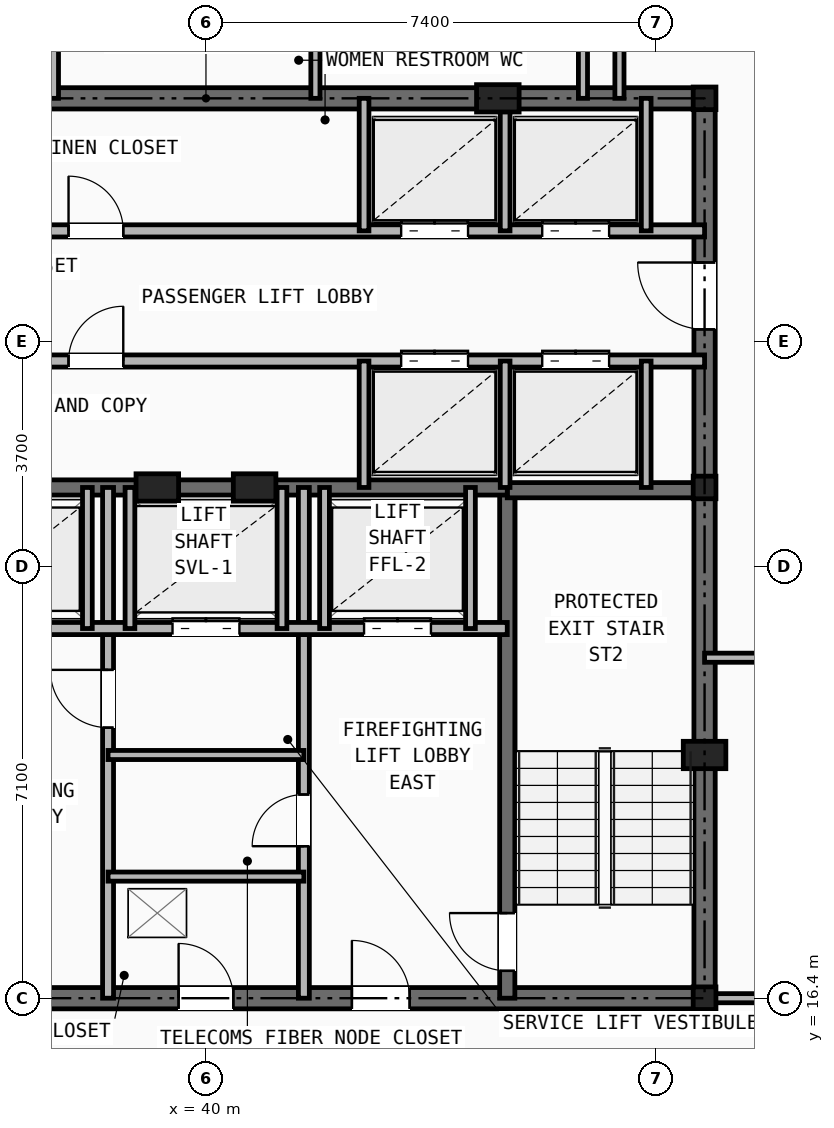
"""IFC4 building model, lengths in metres.
Left out: names, types, materials, properties, quantities, classifications, styles, units other than length and angle.
Written with IfcOpenShell. Run it as: python <this file> out.ifc"""

import sys

from ifc_helpers import new_model, si_unit, direction, frame, frame_2d, origin, origin_2d, place, context, subcontext, project, spatial, rectangle, i_section, extrude, element, fill, save


model = new_model("IFC4")
c1 = context("Model", 3, precision=1e-05, world=origin(), true_north=direction((0.0, 1.0)))
c2 = subcontext(c1, "Body", "Model", "MODEL_VIEW")
j1 = project(units=[si_unit("LENGTHUNIT", "METRE"), si_unit("PLANEANGLEUNIT", "RADIAN")], contexts=[c1])
p1 = place(None, origin())
s1 = spatial("IfcSite", under=j1, at=p1, CompositionType="ELEMENT")
p2 = place(p1, origin())
s2 = spatial("IfcBuilding", under=s1, at=p2, CompositionType="ELEMENT")
p3 = place(p2, frame((0.0, 0.0, 215.4)))
s3 = spatial("IfcBuildingStorey", under=s2, at=p3, CompositionType="ELEMENT", Elevation=215.4)
for number, where, z_axis, x_axis in (
    (1, (48.2, 16.4, 0.0), (0.0, 0.0, 1.0), (1.0, 0.0, 0.0)),
    (2, (48.2, 24.8, 0.0), (0.0, 0.0, 1.0), (1.0, 0.0, 0.0)),
    (3, (48.2, 31.2, 0.0), (0.0, 0.0, 1.0), (1.0, 0.0, 0.0)),
):
    element("IfcColumn", number, at=place(p3, frame(where, z_axis=z_axis, x_axis=x_axis)), inside=s3, PredefinedType="COLUMN", context=c2, shape_type="SweptSolid", body=[
        extrude(i_section(OverallWidth=0.374, OverallDepth=0.372, WebThickness=0.016, FlangeThickness=0.026, at=origin_2d()), origin(), (0.0, 0.0, 1.0), 3.5),
    ])
for number, where, z_axis, x_axis in (
    (4, (48.2, 20.4, 0.0), (0.0, 0.0, 1.0), (1.0, 0.0, 0.0)),
    (5, (44.8, 31.2, 0.0), (0.0, 0.0, 1.0), (1.0, 0.0, 0.0)),
    (6, (39.2, 24.8, 0.0), (0.0, 0.0, 1.0), (1.0, 0.0, 0.0)),
    (7, (40.8, 24.8, 0.0), (0.0, 0.0, 1.0), (1.0, 0.0, 0.0)),
):
    element("IfcColumn", number, at=place(p3, frame(where, z_axis=z_axis, x_axis=x_axis)), inside=s3, PredefinedType="PILASTER", context=c2, shape_type="SweptSolid", body=[
        extrude(rectangle(XDim=0.7, YDim=0.45, at=origin_2d()), origin(), (0.0, 0.0, 1.0), 3.5),
    ])
p4 = place(p3, frame((31.8, 16.4, 0.0), z_axis=(0.0, 0.0, 1.0), x_axis=(1.0, 0.0, 0.0)))
e8 = element("IfcWall", 8, at=p4, inside=s3, PredefinedType="SHEAR", context=c2, shape_type="SweptSolid", body=[
    extrude(rectangle(XDim=16.4, YDim=0.35, at=frame_2d((8.2, 0.0))), origin(), (0.0, 0.0, 1.0), 3.25),
])
p5 = place(p4, frame((7.75, 0.0, 0.0)))
e9 = element("IfcOpeningElement", 9, at=p5, cuts=e8, PredefinedType="OPENING", context=c2, shape_type="SweptSolid", body=[
    extrude(rectangle(XDim=0.9, YDim=2.1, at=frame_2d((0.45, 1.05))), frame((0.0, 0.185, 0.0), z_axis=(0.0, -1.0, 0.0), x_axis=(1.0, 0.0, 0.0)), (0.0, 0.0, 1.0), 0.37),
])
p6 = place(p4, frame((4.2, 0.0, 0.0)))
e10 = element("IfcOpeningElement", 10, at=p6, cuts=e8, PredefinedType="OPENING", context=c2, shape_type="SweptSolid", body=[
    extrude(rectangle(XDim=0.95, YDim=2.1, at=frame_2d((0.475, 1.05))), frame((0.0, 0.185, 0.0), z_axis=(0.0, -1.0, 0.0), x_axis=(1.0, 0.0, 0.0)), (0.0, 0.0, 1.0), 0.37),
])
p7 = place(p4, frame((10.6, 0.0, 0.0)))
e11 = element("IfcOpeningElement", 11, at=p7, cuts=e8, PredefinedType="OPENING", context=c2, shape_type="SweptSolid", body=[
    extrude(rectangle(XDim=0.95, YDim=2.1, at=frame_2d((0.475, 1.05))), frame((0.0, 0.185, 0.0), z_axis=(0.0, -1.0, 0.0), x_axis=(1.0, 0.0, 0.0)), (0.0, 0.0, 1.0), 0.37),
])
p8 = place(p3, frame((31.8, 31.2, 0.0), z_axis=(0.0, 0.0, 1.0), x_axis=(1.0, 0.0, 0.0)))
e12 = element("IfcWall", 12, at=p8, inside=s3, PredefinedType="SHEAR", context=c2, shape_type="SweptSolid", body=[
    extrude(rectangle(XDim=16.4, YDim=0.35, at=frame_2d((8.2, 0.0))), origin(), (0.0, 0.0, 1.0), 3.25),
])
p9 = place(p3, frame((48.2, 16.4, 0.0), z_axis=(0.0, 0.0, 1.0), x_axis=(0.0, 1.0, 0.0)))
e13 = element("IfcWall", 13, at=p9, inside=s3, PredefinedType="SHEAR", context=c2, shape_type="SweptSolid", body=[
    extrude(rectangle(XDim=14.8, YDim=0.35, at=frame_2d((7.4, 0.0))), origin(), (0.0, 0.0, 1.0), 3.25),
])
p10 = place(p9, frame((11.0, 0.0, 0.0)))
e14 = element("IfcOpeningElement", 14, at=p10, cuts=e13, PredefinedType="OPENING", context=c2, shape_type="SweptSolid", body=[
    extrude(rectangle(XDim=1.1, YDim=2.15, at=frame_2d((0.55, 1.075))), frame((0.0, 0.185, 0.0), z_axis=(0.0, -1.0, 0.0), x_axis=(1.0, 0.0, 0.0)), (0.0, 0.0, 1.0), 0.37),
])
p11 = place(p3, frame((44.955, 16.4, 0.0), z_axis=(0.0, 0.0, 1.0), x_axis=(0.0, 1.0, 0.0)))
e15 = element("IfcWall", 15, at=p11, inside=s3, PredefinedType="SHEAR", context=c2, shape_type="SweptSolid", body=[
    extrude(rectangle(XDim=8.4, YDim=0.25, at=frame_2d((4.2, 0.0))), origin(), (0.0, 0.0, 1.0), 3.25),
])
p12 = place(p11, frame((0.45, 0.0, 0.0)))
e16 = element("IfcOpeningElement", 16, at=p12, cuts=e15, PredefinedType="OPENING", context=c2, shape_type="SweptSolid", body=[
    extrude(rectangle(XDim=0.95, YDim=2.1, at=frame_2d((0.475, 1.05))), frame((0.0, 0.135, 0.0), z_axis=(0.0, -1.0, 0.0), x_axis=(1.0, 0.0, 0.0)), (0.0, 0.0, 1.0), 0.27),
])
p13 = place(p3, frame((44.955, 24.755, 0.0), z_axis=(0.0, 0.0, 1.0), x_axis=(1.0, 0.0, 0.0)))
e17 = element("IfcWall", 17, at=p13, inside=s3, PredefinedType="SHEAR", context=c2, shape_type="SweptSolid", body=[
    extrude(rectangle(XDim=3.245, YDim=0.25, at=frame_2d((1.623, 0.0))), origin(), (0.0, 0.0, 1.0), 3.25),
])
p14 = place(p3, frame((35.045, 24.8, 0.0), z_axis=(0.0, 0.0, 1.0), x_axis=(1.0, 0.0, 0.0)))
e18 = element("IfcWall", 18, at=p14, inside=s3, PredefinedType="SHEAR", context=c2, shape_type="SweptSolid", body=[
    extrude(rectangle(XDim=9.91, YDim=0.25, at=frame_2d((4.955, 0.0))), origin(), (0.0, 0.0, 1.0), 3.25),
])
p15 = place(p3, frame((38.39, 16.4, 0.0), z_axis=(0.0, 0.0, 1.0), x_axis=(0.0, 1.0, 0.0)))
e19 = element("IfcWall", 19, at=p15, inside=s3, PredefinedType="PARTITIONING", context=c2, shape_type="SweptSolid", body=[
    extrude(rectangle(XDim=8.4, YDim=0.18, at=frame_2d((4.2, 0.0))), origin(), (0.0, 0.0, 1.0), 2.705),
])
p16 = place(p15, frame((4.45, 0.0, 0.0)))
e20 = element("IfcOpeningElement", 20, at=p16, cuts=e19, PredefinedType="OPENING", context=c2, shape_type="SweptSolid", body=[
    extrude(rectangle(XDim=0.95, YDim=2.1, at=frame_2d((0.475, 1.05))), frame((0.0, 0.1, 0.0), z_axis=(0.0, -1.0, 0.0), x_axis=(1.0, 0.0, 0.0)), (0.0, 0.0, 1.0), 0.2),
])
p17 = place(p3, frame((41.61, 16.4, 0.0), z_axis=(0.0, 0.0, 1.0), x_axis=(0.0, 1.0, 0.0)))
e21 = element("IfcWall", 21, at=p17, inside=s3, PredefinedType="PARTITIONING", context=c2, shape_type="SweptSolid", body=[
    extrude(rectangle(XDim=8.4, YDim=0.18, at=frame_2d((4.2, 0.0))), origin(), (0.0, 0.0, 1.0), 2.705),
])
p18 = place(p17, frame((2.5, 0.0, 0.0)))
e22 = element("IfcOpeningElement", 22, at=p18, cuts=e21, PredefinedType="OPENING", context=c2, shape_type="SweptSolid", body=[
    extrude(rectangle(XDim=0.85, YDim=2.05, at=frame_2d((0.425, 1.025))), frame((0.0, 0.1, 0.0), z_axis=(0.0, -1.0, 0.0), x_axis=(1.0, 0.0, 0.0)), (0.0, 0.0, 1.0), 0.2),
])
p19 = place(p3, frame((35.045, 22.48, 0.0), z_axis=(0.0, 0.0, 1.0), x_axis=(1.0, 0.0, 0.0)))
e23 = element("IfcWall", 23, at=p19, inside=s3, PredefinedType="SOLIDWALL", context=c2, shape_type="SweptSolid", body=[
    extrude(rectangle(XDim=9.91, YDim=0.2, at=frame_2d((4.955, 0.0))), origin(), (0.0, 0.0, 1.0), 3.25),
])
p20 = place(p19, frame((1.255, 0.0, 0.0)))
e24 = element("IfcOpeningElement", 24, at=p20, cuts=e23, PredefinedType="OPENING", context=c2, shape_type="SweptSolid", body=[
    extrude(rectangle(XDim=1.1, YDim=2.15, at=frame_2d((0.55, 1.075))), frame((0.0, 0.11, 0.0), z_axis=(0.0, -1.0, 0.0), x_axis=(1.0, 0.0, 0.0)), (0.0, 0.0, 1.0), 0.22),
])
p21 = place(p19, frame((7.555, 0.0, 0.0)))
e25 = element("IfcOpeningElement", 25, at=p21, cuts=e23, PredefinedType="OPENING", context=c2, shape_type="SweptSolid", body=[
    extrude(rectangle(XDim=1.1, YDim=2.15, at=frame_2d((0.55, 1.075))), frame((0.0, 0.11, 0.0), z_axis=(0.0, -1.0, 0.0), x_axis=(1.0, 0.0, 0.0)), (0.0, 0.0, 1.0), 0.22),
])
p22 = place(p19, frame((4.405, 0.0, 0.0)))
e26 = element("IfcOpeningElement", 26, at=p22, cuts=e23, PredefinedType="OPENING", context=c2, shape_type="SweptSolid", body=[
    extrude(rectangle(XDim=1.1, YDim=2.15, at=frame_2d((0.55, 1.075))), frame((0.0, 0.11, 0.0), z_axis=(0.0, -1.0, 0.0), x_axis=(1.0, 0.0, 0.0)), (0.0, 0.0, 1.0), 0.22),
])
for number, where, z_axis, x_axis in (
    (27, (38.39, 18.4, 0.0), (0.0, 0.0, 1.0), (1.0, 0.0, 0.0)),
    (28, (38.39, 20.4, 0.0), (0.0, 0.0, 1.0), (1.0, 0.0, 0.0)),
):
    element("IfcWall", number, at=place(p3, frame(where, z_axis=z_axis, x_axis=x_axis)), inside=s3, PredefinedType="PARTITIONING", context=c2, shape_type="SweptSolid", body=[
        extrude(rectangle(XDim=3.22, YDim=0.15, at=frame_2d((1.61, 0.0))), origin(), (0.0, 0.0, 1.0), 3.25),
    ])
for number, where, z_axis, x_axis in (
    (29, (38.05, 22.48, 0.0), (0.0, 0.0, 1.0), (0.0, 1.0, 0.0)),
    (30, (41.95, 22.48, 0.0), (0.0, 0.0, 1.0), (0.0, 1.0, 0.0)),
    (31, (44.35, 22.48, 0.0), (0.0, 0.0, 1.0), (0.0, 1.0, 0.0)),
    (32, (38.75, 22.48, 0.0), (0.0, 0.0, 1.0), (0.0, 1.0, 0.0)),
    (33, (41.25, 22.48, 0.0), (0.0, 0.0, 1.0), (0.0, 1.0, 0.0)),
):
    element("IfcWall", number, at=place(p3, frame(where, z_axis=z_axis, x_axis=x_axis)), inside=s3, PredefinedType="SOLIDWALL", context=c2, shape_type="SweptSolid", body=[
        extrude(rectangle(XDim=2.32, YDim=0.16, at=frame_2d((1.16, 0.0))), origin(), (0.0, 0.0, 1.0), 3.25),
    ])
p23 = place(p3, frame((31.8, 29.02, 0.0), z_axis=(0.0, 0.0, 1.0), x_axis=(1.0, 0.0, 0.0)))
e34 = element("IfcWall", 34, at=p23, inside=s3, PredefinedType="SOLIDWALL", context=c2, shape_type="SweptSolid", body=[
    extrude(rectangle(XDim=16.4, YDim=0.2, at=frame_2d((8.2, 0.0))), origin(), (0.0, 0.0, 1.0), 2.705),
])
p24 = place(p23, frame((0.55, 0.0, 0.0)))
e35 = element("IfcOpeningElement", 35, at=p24, cuts=e34, PredefinedType="OPENING", context=c2, shape_type="SweptSolid", body=[
    extrude(rectangle(XDim=0.85, YDim=2.05, at=frame_2d((0.425, 1.025))), frame((0.0, 0.11, 0.0), z_axis=(0.0, -1.0, 0.0), x_axis=(1.0, 0.0, 0.0)), (0.0, 0.0, 1.0), 0.22),
])
p25 = place(p23, frame((5.94, 0.0, 0.0)))
e36 = element("IfcOpeningElement", 36, at=p25, cuts=e34, PredefinedType="OPENING", context=c2, shape_type="SweptSolid", body=[
    extrude(rectangle(XDim=0.9, YDim=2.1, at=frame_2d((0.45, 1.05))), frame((0.0, 0.11, 0.0), z_axis=(0.0, -1.0, 0.0), x_axis=(1.0, 0.0, 0.0)), (0.0, 0.0, 1.0), 0.22),
])
p26 = place(p23, frame((11.41, 0.0, 0.0)))
e37 = element("IfcOpeningElement", 37, at=p26, cuts=e34, PredefinedType="OPENING", context=c2, shape_type="SweptSolid", body=[
    extrude(rectangle(XDim=1.1, YDim=2.15, at=frame_2d((0.55, 1.075))), frame((0.0, 0.11, 0.0), z_axis=(0.0, -1.0, 0.0), x_axis=(1.0, 0.0, 0.0)), (0.0, 0.0, 1.0), 0.22),
])
p27 = place(p23, frame((13.73, 0.0, 0.0)))
e38 = element("IfcOpeningElement", 38, at=p27, cuts=e34, PredefinedType="OPENING", context=c2, shape_type="SweptSolid", body=[
    extrude(rectangle(XDim=1.1, YDim=2.15, at=frame_2d((0.55, 1.075))), frame((0.0, 0.11, 0.0), z_axis=(0.0, -1.0, 0.0), x_axis=(1.0, 0.0, 0.0)), (0.0, 0.0, 1.0), 0.22),
])
p28 = place(p3, frame((31.8, 26.88, 0.0), z_axis=(0.0, 0.0, 1.0), x_axis=(1.0, 0.0, 0.0)))
e39 = element("IfcWall", 39, at=p28, inside=s3, PredefinedType="SOLIDWALL", context=c2, shape_type="SweptSolid", body=[
    extrude(rectangle(XDim=16.4, YDim=0.2, at=frame_2d((8.2, 0.0))), origin(), (0.0, 0.0, 1.0), 2.705),
])
p29 = place(p28, frame((0.55, 0.0, 0.0)))
e40 = element("IfcOpeningElement", 40, at=p29, cuts=e39, PredefinedType="OPENING", context=c2, shape_type="SweptSolid", body=[
    extrude(rectangle(XDim=0.85, YDim=2.05, at=frame_2d((0.425, 1.025))), frame((0.0, 0.11, 0.0), z_axis=(0.0, -1.0, 0.0), x_axis=(1.0, 0.0, 0.0)), (0.0, 0.0, 1.0), 0.22),
])
p30 = place(p28, frame((5.94, 0.0, 0.0)))
e41 = element("IfcOpeningElement", 41, at=p30, cuts=e39, PredefinedType="OPENING", context=c2, shape_type="SweptSolid", body=[
    extrude(rectangle(XDim=0.9, YDim=2.1, at=frame_2d((0.45, 1.05))), frame((0.0, 0.11, 0.0), z_axis=(0.0, -1.0, 0.0), x_axis=(1.0, 0.0, 0.0)), (0.0, 0.0, 1.0), 0.22),
])
p31 = place(p28, frame((11.41, 0.0, 0.0)))
e42 = element("IfcOpeningElement", 42, at=p31, cuts=e39, PredefinedType="OPENING", context=c2, shape_type="SweptSolid", body=[
    extrude(rectangle(XDim=1.1, YDim=2.15, at=frame_2d((0.55, 1.075))), frame((0.0, 0.11, 0.0), z_axis=(0.0, -1.0, 0.0), x_axis=(1.0, 0.0, 0.0)), (0.0, 0.0, 1.0), 0.22),
])
p32 = place(p28, frame((13.73, 0.0, 0.0)))
e43 = element("IfcOpeningElement", 43, at=p32, cuts=e39, PredefinedType="OPENING", context=c2, shape_type="SweptSolid", body=[
    extrude(rectangle(XDim=1.1, YDim=2.15, at=frame_2d((0.55, 1.075))), frame((0.0, 0.11, 0.0), z_axis=(0.0, -1.0, 0.0), x_axis=(1.0, 0.0, 0.0)), (0.0, 0.0, 1.0), 0.22),
])
for number, where, z_axis, x_axis in (
    (44, (42.6, 29.02, 0.0), (0.0, 0.0, 1.0), (0.0, 1.0, 0.0)),
    (45, (44.92, 29.02, 0.0), (0.0, 0.0, 1.0), (0.0, 1.0, 0.0)),
    (46, (47.24, 29.02, 0.0), (0.0, 0.0, 1.0), (0.0, 1.0, 0.0)),
):
    element("IfcWall", number, at=place(p3, frame(where, z_axis=z_axis, x_axis=x_axis)), inside=s3, PredefinedType="SOLIDWALL", context=c2, shape_type="SweptSolid", body=[
        extrude(rectangle(XDim=2.18, YDim=0.16, at=frame_2d((1.09, 0.0))), origin(), (0.0, 0.0, 1.0), 2.705),
    ])
for number, where, z_axis, x_axis in (
    (47, (42.6, 24.8, 0.0), (0.0, 0.0, 1.0), (0.0, 1.0, 0.0)),
    (48, (44.92, 24.8, 0.0), (0.0, 0.0, 1.0), (0.0, 1.0, 0.0)),
    (49, (47.24, 24.8, 0.0), (0.0, 0.0, 1.0), (0.0, 1.0, 0.0)),
):
    element("IfcWall", number, at=place(p3, frame(where, z_axis=z_axis, x_axis=x_axis)), inside=s3, PredefinedType="SOLIDWALL", context=c2, shape_type="SweptSolid", body=[
        extrude(rectangle(XDim=2.08, YDim=0.16, at=frame_2d((1.04, 0.0))), origin(), (0.0, 0.0, 1.0), 3.25),
    ])
for number, where, z_axis, x_axis in (
    (50, (46.2, 31.2, 0.0), (0.0, 0.0, 1.0), (0.0, 1.0, 0.0)),
    (51, (37.5, 31.2, 0.0), (0.0, 0.0, 1.0), (0.0, 1.0, 0.0)),
    (52, (41.8, 31.2, 0.0), (0.0, 0.0, 1.0), (0.0, 1.0, 0.0)),
):
    element("IfcWall", number, at=place(p3, frame(where, z_axis=z_axis, x_axis=x_axis)), inside=s3, PredefinedType="PARTITIONING", context=c2, shape_type="SweptSolid", body=[
        extrude(rectangle(XDim=2.6, YDim=0.15, at=frame_2d((1.3, 0.0))), origin(), (0.0, 0.0, 1.0), 2.705),
    ])
p33 = place(p3, frame((48.2, 16.4, 0.0), z_axis=(0.0, 0.0, 1.0), x_axis=(1.0, 0.0, 0.0)))
e53 = element("IfcWall", 53, at=p33, inside=s3, PredefinedType="PARTITIONING", context=c2, shape_type="SweptSolid", body=[
    extrude(rectangle(XDim=15.888, YDim=0.15, at=frame_2d((7.944, 0.0))), origin(), (0.0, 0.0, 1.0), 2.292),
])
p34 = place(p3, frame((46.8, 31.2, 0.0), z_axis=(0.0, 0.0, 1.0), x_axis=(0.0, 1.0, 0.0)))
e54 = element("IfcWall", 54, at=p34, inside=s3, PredefinedType="PARTITIONING", context=c2, shape_type="SweptSolid", body=[
    extrude(rectangle(XDim=4.5, YDim=0.15, at=frame_2d((2.25, 0.0))), origin(), (0.0, 0.0, 1.0), 2.705),
])
p35 = place(p3, frame((48.2, 22.0, 0.0), z_axis=(0.0, 0.0, 1.0), x_axis=(1.0, 0.0, 0.0)))
e55 = element("IfcWall", 55, at=p35, inside=s3, PredefinedType="PARTITIONING", context=c2, shape_type="SweptSolid", body=[
    extrude(rectangle(XDim=12.052, YDim=0.15, at=frame_2d((6.026, 0.0))), origin(), (0.0, 0.0, 1.0), 2.292),
])
p36 = place(p35, frame((1.4, 0.0, 0.0)))
e56 = element("IfcOpeningElement", 56, at=p36, cuts=e55, PredefinedType="OPENING", context=c2, shape_type="SweptSolid", body=[
    extrude(rectangle(XDim=0.95, YDim=2.1, at=frame_2d((0.475, 1.05))), frame((0.0, 0.085, 0.0), z_axis=(0.0, -1.0, 0.0), x_axis=(1.0, 0.0, 0.0)), (0.0, 0.0, 1.0), 0.17),
])
p37 = place(p5, origin())
e57 = element("IfcDoor", 57, at=p37, inside=s3, OperationType="SINGLE_SWING_LEFT", PredefinedType="DOOR", context=c2, shape_type="SweptSolid", body=[
    extrude(rectangle(XDim=0.9, YDim=2.1, at=frame_2d((0.45, 1.05))), frame((0.0, 0.025, 0.0), z_axis=(0.0, -1.0, 0.0), x_axis=(1.0, 0.0, 0.0)), (0.0, 0.0, 1.0), 0.05),
])
fill(e9, e57)
p38 = place(p18, origin())
e58 = element("IfcDoor", 58, at=p38, inside=s3, OperationType="SINGLE_SWING_LEFT", PredefinedType="DOOR", context=c2, shape_type="SweptSolid", body=[
    extrude(rectangle(XDim=0.85, YDim=2.05, at=frame_2d((0.425, 1.025))), frame((0.0, 0.025, 0.0), z_axis=(0.0, -1.0, 0.0), x_axis=(1.0, 0.0, 0.0)), (0.0, 0.0, 1.0), 0.05),
])
fill(e22, e58)
p39 = place(p16, origin())
e59 = element("IfcDoor", 59, at=p39, inside=s3, OperationType="SINGLE_SWING_RIGHT", PredefinedType="DOOR", context=c2, shape_type="SweptSolid", body=[
    extrude(rectangle(XDim=0.95, YDim=2.1, at=frame_2d((0.475, 1.05))), frame((0.0, 0.025, 0.0), z_axis=(0.0, -1.0, 0.0), x_axis=(1.0, 0.0, 0.0)), (0.0, 0.0, 1.0), 0.05),
])
fill(e20, e59)
p40 = place(p12, origin())
e60 = element("IfcDoor", 60, at=p40, inside=s3, OperationType="SINGLE_SWING_RIGHT", PredefinedType="DOOR", context=c2, shape_type="SweptSolid", body=[
    extrude(rectangle(XDim=0.95, YDim=2.1, at=frame_2d((0.475, 1.05))), frame((0.0, 0.025, 0.0), z_axis=(0.0, -1.0, 0.0), x_axis=(1.0, 0.0, 0.0)), (0.0, 0.0, 1.0), 0.05),
])
fill(e16, e60)
p41 = place(p7, origin())
e61 = element("IfcDoor", 61, at=p41, inside=s3, OperationType="SINGLE_SWING_LEFT", PredefinedType="DOOR", context=c2, shape_type="SweptSolid", body=[
    extrude(rectangle(XDim=0.95, YDim=2.1, at=frame_2d((0.475, 1.05))), frame((0.0, 0.025, 0.0), z_axis=(0.0, -1.0, 0.0), x_axis=(1.0, 0.0, 0.0)), (0.0, 0.0, 1.0), 0.05),
])
fill(e11, e61)
p42 = place(p21, origin())
e62 = element("IfcDoor", 62, at=p42, inside=s3, OperationType="DOUBLE_DOOR_SLIDING", PredefinedType="DOOR", context=c2, shape_type="SweptSolid", body=[
    extrude(rectangle(XDim=1.1, YDim=2.15, at=frame_2d((0.55, 1.075))), frame((0.0, 0.025, 0.0), z_axis=(0.0, -1.0, 0.0), x_axis=(1.0, 0.0, 0.0)), (0.0, 0.0, 1.0), 0.05),
])
fill(e25, e62)
p43 = place(p22, origin())
e63 = element("IfcDoor", 63, at=p43, inside=s3, OperationType="DOUBLE_DOOR_SLIDING", PredefinedType="DOOR", context=c2, shape_type="SweptSolid", body=[
    extrude(rectangle(XDim=1.1, YDim=2.15, at=frame_2d((0.55, 1.075))), frame((0.0, 0.025, 0.0), z_axis=(0.0, -1.0, 0.0), x_axis=(1.0, 0.0, 0.0)), (0.0, 0.0, 1.0), 0.05),
])
fill(e26, e63)
p44 = place(p10, origin())
e64 = element("IfcDoor", 64, at=p44, inside=s3, OperationType="SINGLE_SWING_RIGHT", PredefinedType="DOOR", context=c2, shape_type="SweptSolid", body=[
    extrude(rectangle(XDim=1.1, YDim=2.15, at=frame_2d((0.55, 1.075))), frame((0.0, 0.025, 0.0), z_axis=(0.0, -1.0, 0.0), x_axis=(1.0, 0.0, 0.0)), (0.0, 0.0, 1.0), 0.05),
])
fill(e14, e64)
p45 = place(p25, origin())
e65 = element("IfcDoor", 65, at=p45, inside=s3, OperationType="SINGLE_SWING_LEFT", PredefinedType="DOOR", context=c2, shape_type="SweptSolid", body=[
    extrude(rectangle(XDim=0.9, YDim=2.1, at=frame_2d((0.45, 1.05))), frame((0.0, 0.025, 0.0), z_axis=(0.0, -1.0, 0.0), x_axis=(1.0, 0.0, 0.0)), (0.0, 0.0, 1.0), 0.05),
])
fill(e36, e65)
p46 = place(p30, origin())
e66 = element("IfcDoor", 66, at=p46, inside=s3, OperationType="SINGLE_SWING_RIGHT", PredefinedType="DOOR", context=c2, shape_type="SweptSolid", body=[
    extrude(rectangle(XDim=0.9, YDim=2.1, at=frame_2d((0.45, 1.05))), frame((0.0, 0.025, 0.0), z_axis=(0.0, -1.0, 0.0), x_axis=(1.0, 0.0, 0.0)), (0.0, 0.0, 1.0), 0.05),
])
fill(e41, e66)
p47 = place(p26, origin())
e67 = element("IfcDoor", 67, at=p47, inside=s3, OperationType="DOUBLE_DOOR_SLIDING", PredefinedType="DOOR", context=c2, shape_type="SweptSolid", body=[
    extrude(rectangle(XDim=1.1, YDim=2.15, at=frame_2d((0.55, 1.075))), frame((0.0, 0.025, 0.0), z_axis=(0.0, -1.0, 0.0), x_axis=(1.0, 0.0, 0.0)), (0.0, 0.0, 1.0), 0.05),
])
fill(e37, e67)
p48 = place(p27, origin())
e68 = element("IfcDoor", 68, at=p48, inside=s3, OperationType="DOUBLE_DOOR_SLIDING", PredefinedType="DOOR", context=c2, shape_type="SweptSolid", body=[
    extrude(rectangle(XDim=1.1, YDim=2.15, at=frame_2d((0.55, 1.075))), frame((0.0, 0.025, 0.0), z_axis=(0.0, -1.0, 0.0), x_axis=(1.0, 0.0, 0.0)), (0.0, 0.0, 1.0), 0.05),
])
fill(e38, e68)
p49 = place(p31, origin())
e69 = element("IfcDoor", 69, at=p49, inside=s3, OperationType="DOUBLE_DOOR_SLIDING", PredefinedType="DOOR", context=c2, shape_type="SweptSolid", body=[
    extrude(rectangle(XDim=1.1, YDim=2.15, at=frame_2d((0.55, 1.075))), frame((0.0, 0.025, 0.0), z_axis=(0.0, -1.0, 0.0), x_axis=(1.0, 0.0, 0.0)), (0.0, 0.0, 1.0), 0.05),
])
fill(e42, e69)
p50 = place(p32, origin())
e70 = element("IfcDoor", 70, at=p50, inside=s3, OperationType="DOUBLE_DOOR_SLIDING", PredefinedType="DOOR", context=c2, shape_type="SweptSolid", body=[
    extrude(rectangle(XDim=1.1, YDim=2.15, at=frame_2d((0.55, 1.075))), frame((0.0, 0.025, 0.0), z_axis=(0.0, -1.0, 0.0), x_axis=(1.0, 0.0, 0.0)), (0.0, 0.0, 1.0), 0.05),
])
fill(e43, e70)
save(model, sys.argv[1])
